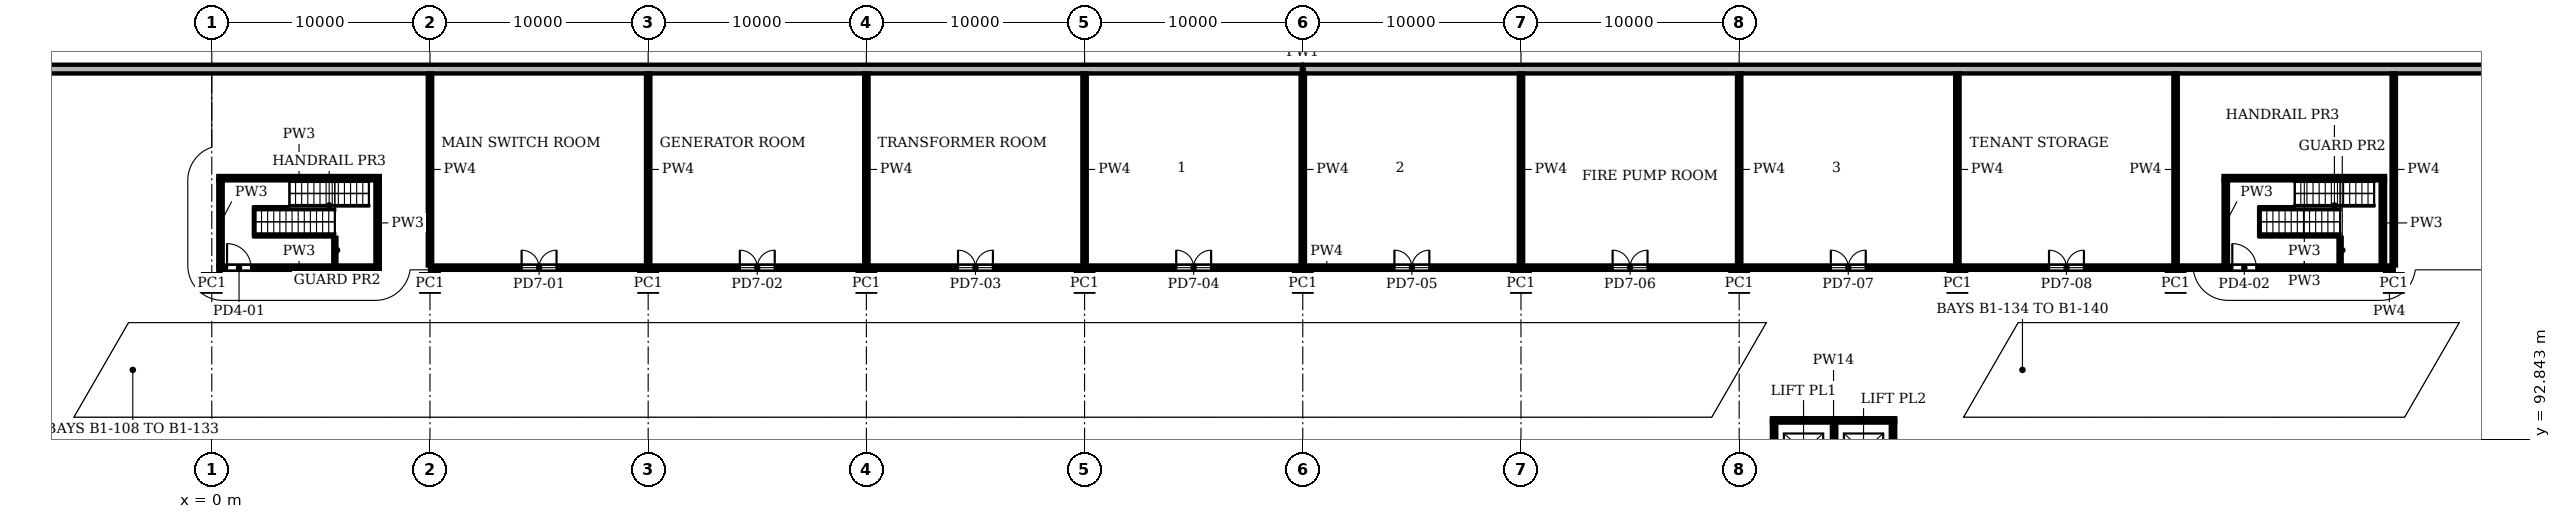
"""IFC4 building model, lengths in metres.
Left out: names, types, materials, properties, quantities, classifications, styles, units other than length and angle.
Written with IfcOpenShell. Run it as: python <this file> out.ifc"""

import sys

from ifc_helpers import new_model, si_unit, direction, frame, frame_2d, origin, origin_2d, place, context, subcontext, project, spatial, rectangle, extrude, element, fill, save


model = new_model("IFC4")
c1 = context("Model", 3, precision=1e-05, world=origin(), true_north=direction((0.0, 1.0)))
c2 = subcontext(c1, "Body", "Model", "MODEL_VIEW")
j1 = project(units=[si_unit("LENGTHUNIT", "METRE"), si_unit("PLANEANGLEUNIT", "RADIAN")], contexts=[c1])
p1 = place(None, origin())
s1 = spatial("IfcSite", under=j1, at=p1, CompositionType="ELEMENT")
p2 = place(p1, origin())
s2 = spatial("IfcBuilding", under=s1, at=p2, CompositionType="ELEMENT")
p3 = place(p2, frame((0.0, 0.0, -4.5)))
s3 = spatial("IfcBuildingStorey", under=s2, at=p3, CompositionType="ELEMENT", Elevation=-4.5)
for number, where, z_axis, x_axis in (
    (1, (0.0, 100.0, 0.0), (0.0, 0.0, 1.0), (1.0, 0.0, 0.0)),
    (2, (10.0, 100.0, 0.0), (0.0, 0.0, 1.0), (1.0, 0.0, 0.0)),
    (3, (20.0, 100.0, 0.0), (0.0, 0.0, 1.0), (1.0, 0.0, 0.0)),
    (4, (30.0, 100.0, 0.0), (0.0, 0.0, 1.0), (1.0, 0.0, 0.0)),
    (5, (40.0, 100.0, 0.0), (0.0, 0.0, 1.0), (1.0, 0.0, 0.0)),
    (6, (50.0, 100.0, 0.0), (0.0, 0.0, 1.0), (1.0, 0.0, 0.0)),
    (7, (60.0, 100.0, 0.0), (0.0, 0.0, 1.0), (1.0, 0.0, 0.0)),
    (8, (70.0, 100.0, 0.0), (0.0, 0.0, 1.0), (1.0, 0.0, 0.0)),
    (9, (80.0, 100.0, 0.0), (0.0, 0.0, 1.0), (1.0, 0.0, 0.0)),
    (10, (90.0, 100.0, 0.0), (0.0, 0.0, 1.0), (1.0, 0.0, 0.0)),
    (11, (100.0, 100.0, 0.0), (0.0, 0.0, 1.0), (1.0, 0.0, 0.0)),
):
    element("IfcColumn", number, at=place(p3, frame(where, z_axis=z_axis, x_axis=x_axis)), inside=s3, PredefinedType="COLUMN", context=c2, shape_type="SweptSolid", body=[
        extrude(rectangle(XDim=0.8, YDim=0.8, at=origin_2d()), origin(), (0.0, 0.0, 1.0), 4.0),
    ])
p4 = place(p3, frame((110.0, 109.8, 0.0), z_axis=(0.0, 0.0, 1.0), x_axis=(-1.0, 0.0, 0.0)))
e12 = element("IfcWall", 12, at=p4, inside=s3, PredefinedType="SOLIDWALL", context=c2, shape_type="SweptSolid", body=[
    extrude(rectangle(XDim=120.0, YDim=0.4, at=frame_2d((60.0, 0.0))), origin(), (0.0, 0.0, 1.0), 4.1),
])
p5 = place(p3, frame((10.0, 100.7, 0.0), z_axis=(0.0, 0.0, 1.0), x_axis=(1.0, 0.0, 0.0)))
e13 = element("IfcWall", 13, at=p5, inside=s3, PredefinedType="PARTITIONING", context=c2, shape_type="SweptSolid", body=[
    extrude(rectangle(XDim=82.2, YDim=0.2, at=frame_2d((41.1, 0.0))), origin(), (0.0, 0.0, 1.0), 4.0),
])
p6 = place(p5, frame((4.2, 0.0, 0.0)))
e14 = element("IfcOpeningElement", 14, at=p6, cuts=e13, PredefinedType="OPENING", context=c2, shape_type="SweptSolid", body=[
    extrude(rectangle(XDim=1.6, YDim=2.1, at=frame_2d((0.8, 1.05))), frame((0.0, 0.11, 0.0), z_axis=(0.0, -1.0, 0.0), x_axis=(1.0, 0.0, 0.0)), (0.0, 0.0, 1.0), 0.22),
])
p7 = place(p5, frame((14.2, 0.0, 0.0)))
e15 = element("IfcOpeningElement", 15, at=p7, cuts=e13, PredefinedType="OPENING", context=c2, shape_type="SweptSolid", body=[
    extrude(rectangle(XDim=1.6, YDim=2.1, at=frame_2d((0.8, 1.05))), frame((0.0, 0.11, 0.0), z_axis=(0.0, -1.0, 0.0), x_axis=(1.0, 0.0, 0.0)), (0.0, 0.0, 1.0), 0.22),
])
p8 = place(p5, frame((24.2, 0.0, 0.0)))
e16 = element("IfcOpeningElement", 16, at=p8, cuts=e13, PredefinedType="OPENING", context=c2, shape_type="SweptSolid", body=[
    extrude(rectangle(XDim=1.6, YDim=2.1, at=frame_2d((0.8, 1.05))), frame((0.0, 0.11, 0.0), z_axis=(0.0, -1.0, 0.0), x_axis=(1.0, 0.0, 0.0)), (0.0, 0.0, 1.0), 0.22),
])
p9 = place(p5, frame((34.2, 0.0, 0.0)))
e17 = element("IfcOpeningElement", 17, at=p9, cuts=e13, PredefinedType="OPENING", context=c2, shape_type="SweptSolid", body=[
    extrude(rectangle(XDim=1.6, YDim=2.1, at=frame_2d((0.8, 1.05))), frame((0.0, 0.11, 0.0), z_axis=(0.0, -1.0, 0.0), x_axis=(1.0, 0.0, 0.0)), (0.0, 0.0, 1.0), 0.22),
])
p10 = place(p5, frame((44.2, 0.0, 0.0)))
e18 = element("IfcOpeningElement", 18, at=p10, cuts=e13, PredefinedType="OPENING", context=c2, shape_type="SweptSolid", body=[
    extrude(rectangle(XDim=1.6, YDim=2.1, at=frame_2d((0.8, 1.05))), frame((0.0, 0.11, 0.0), z_axis=(0.0, -1.0, 0.0), x_axis=(1.0, 0.0, 0.0)), (0.0, 0.0, 1.0), 0.22),
])
p11 = place(p5, frame((54.2, 0.0, 0.0)))
e19 = element("IfcOpeningElement", 19, at=p11, cuts=e13, PredefinedType="OPENING", context=c2, shape_type="SweptSolid", body=[
    extrude(rectangle(XDim=1.6, YDim=2.1, at=frame_2d((0.8, 1.05))), frame((0.0, 0.11, 0.0), z_axis=(0.0, -1.0, 0.0), x_axis=(1.0, 0.0, 0.0)), (0.0, 0.0, 1.0), 0.22),
])
p12 = place(p5, frame((64.2, 0.0, 0.0)))
e20 = element("IfcOpeningElement", 20, at=p12, cuts=e13, PredefinedType="OPENING", context=c2, shape_type="SweptSolid", body=[
    extrude(rectangle(XDim=1.6, YDim=2.1, at=frame_2d((0.8, 1.05))), frame((0.0, 0.11, 0.0), z_axis=(0.0, -1.0, 0.0), x_axis=(1.0, 0.0, 0.0)), (0.0, 0.0, 1.0), 0.22),
])
p13 = place(p5, frame((74.2, 0.0, 0.0)))
e21 = element("IfcOpeningElement", 21, at=p13, cuts=e13, PredefinedType="OPENING", context=c2, shape_type="SweptSolid", body=[
    extrude(rectangle(XDim=1.6, YDim=2.1, at=frame_2d((0.8, 1.05))), frame((0.0, 0.11, 0.0), z_axis=(0.0, -1.0, 0.0), x_axis=(1.0, 0.0, 0.0)), (0.0, 0.0, 1.0), 0.22),
])
p14 = place(p3, frame((99.6, 100.7, 0.0), z_axis=(0.0, 0.0, 1.0), x_axis=(1.0, 0.0, 0.0)))
e22 = element("IfcWall", 22, at=p14, inside=s3, PredefinedType="PARTITIONING", context=c2, shape_type="SweptSolid", body=[
    extrude(rectangle(XDim=0.4, YDim=0.2, at=frame_2d((0.2, 0.0))), origin(), (0.0, 0.0, 1.0), 4.0),
])
for number, where, z_axis, x_axis in (
    (23, (10.0, 100.8, 0.0), (0.0, 0.0, 1.0), (0.0, 1.0, 0.0)),
    (24, (20.0, 100.8, 0.0), (0.0, 0.0, 1.0), (0.0, 1.0, 0.0)),
    (25, (30.0, 100.8, 0.0), (0.0, 0.0, 1.0), (0.0, 1.0, 0.0)),
    (26, (40.0, 100.8, 0.0), (0.0, 0.0, 1.0), (0.0, 1.0, 0.0)),
    (27, (50.0, 100.8, 0.0), (0.0, 0.0, 1.0), (0.0, 1.0, 0.0)),
    (28, (60.0, 100.8, 0.0), (0.0, 0.0, 1.0), (0.0, 1.0, 0.0)),
    (29, (70.0, 100.8, 0.0), (0.0, 0.0, 1.0), (0.0, 1.0, 0.0)),
    (30, (80.0, 100.8, 0.0), (0.0, 0.0, 1.0), (0.0, 1.0, 0.0)),
    (31, (90.0, 100.8, 0.0), (0.0, 0.0, 1.0), (0.0, 1.0, 0.0)),
    (32, (100.0, 100.8, 0.0), (0.0, 0.0, 1.0), (0.0, 1.0, 0.0)),
):
    element("IfcWall", number, at=place(p3, frame(where, z_axis=z_axis, x_axis=x_axis)), inside=s3, PredefinedType="PARTITIONING", context=c2, shape_type="SweptSolid", body=[
        extrude(rectangle(XDim=8.8, YDim=0.2, at=frame_2d((4.4, 0.0))), origin(), (0.0, 0.0, 1.0), 4.0),
    ])
p15 = place(p3, frame((0.3, 100.7, 0.0), z_axis=(0.0, 0.0, 1.0), x_axis=(1.0, 0.0, 0.0)))
e33 = element("IfcWall", 33, at=p15, inside=s3, PredefinedType="SOLIDWALL", context=c2, shape_type="SweptSolid", body=[
    extrude(rectangle(XDim=7.4, YDim=0.2, at=frame_2d((3.7, 0.0))), origin(), (0.0, 0.0, 1.0), 4.0),
])
p16 = place(p15, frame((0.4, 0.0, 0.0)))
e34 = element("IfcOpeningElement", 34, at=p16, cuts=e33, PredefinedType="OPENING", context=c2, shape_type="SweptSolid", body=[
    extrude(rectangle(XDim=1.1, YDim=2.1, at=frame_2d((0.55, 1.05))), frame((0.0, 0.11, 0.0), z_axis=(0.0, -1.0, 0.0), x_axis=(1.0, 0.0, 0.0)), (0.0, 0.0, 1.0), 0.22),
])
p17 = place(p3, frame((0.3, 104.8, 0.0), z_axis=(0.0, 0.0, 1.0), x_axis=(1.0, 0.0, 0.0)))
e35 = element("IfcWall", 35, at=p17, inside=s3, PredefinedType="SOLIDWALL", context=c2, shape_type="SweptSolid", body=[
    extrude(rectangle(XDim=7.4, YDim=0.2, at=frame_2d((3.7, 0.0))), origin(), (0.0, 0.0, 1.0), 4.0),
])
for number, where, z_axis, x_axis in (
    (36, (0.4, 100.8, 0.0), (0.0, 0.0, 1.0), (0.0, 1.0, 0.0)),
    (37, (7.6, 100.8, 0.0), (0.0, 0.0, 1.0), (0.0, 1.0, 0.0)),
):
    element("IfcWall", number, at=place(p3, frame(where, z_axis=z_axis, x_axis=x_axis)), inside=s3, PredefinedType="SOLIDWALL", context=c2, shape_type="SweptSolid", body=[
        extrude(rectangle(XDim=3.9, YDim=0.2, at=frame_2d((1.95, 0.0))), origin(), (0.0, 0.0, 1.0), 4.0),
    ])
p18 = place(p3, frame((92.2, 100.7, 0.0), z_axis=(0.0, 0.0, 1.0), x_axis=(1.0, 0.0, 0.0)))
e38 = element("IfcWall", 38, at=p18, inside=s3, PredefinedType="SOLIDWALL", context=c2, shape_type="SweptSolid", body=[
    extrude(rectangle(XDim=7.4, YDim=0.2, at=frame_2d((3.7, 0.0))), origin(), (0.0, 0.0, 1.0), 4.0),
])
p19 = place(p18, frame((0.4, 0.0, 0.0)))
e39 = element("IfcOpeningElement", 39, at=p19, cuts=e38, PredefinedType="OPENING", context=c2, shape_type="SweptSolid", body=[
    extrude(rectangle(XDim=1.1, YDim=2.1, at=frame_2d((0.55, 1.05))), frame((0.0, 0.11, 0.0), z_axis=(0.0, -1.0, 0.0), x_axis=(1.0, 0.0, 0.0)), (0.0, 0.0, 1.0), 0.22),
])
p20 = place(p3, frame((92.2, 104.8, 0.0), z_axis=(0.0, 0.0, 1.0), x_axis=(1.0, 0.0, 0.0)))
e40 = element("IfcWall", 40, at=p20, inside=s3, PredefinedType="SOLIDWALL", context=c2, shape_type="SweptSolid", body=[
    extrude(rectangle(XDim=7.4, YDim=0.2, at=frame_2d((3.7, 0.0))), origin(), (0.0, 0.0, 1.0), 4.0),
])
for number, where, z_axis, x_axis in (
    (41, (92.3, 100.8, 0.0), (0.0, 0.0, 1.0), (0.0, 1.0, 0.0)),
    (42, (99.5, 100.8, 0.0), (0.0, 0.0, 1.0), (0.0, 1.0, 0.0)),
):
    element("IfcWall", number, at=place(p3, frame(where, z_axis=z_axis, x_axis=x_axis)), inside=s3, PredefinedType="SOLIDWALL", context=c2, shape_type="SweptSolid", body=[
        extrude(rectangle(XDim=3.9, YDim=0.2, at=frame_2d((1.95, 0.0))), origin(), (0.0, 0.0, 1.0), 4.0),
    ])
p21 = place(p3, frame((71.5, 93.7, 0.0), z_axis=(0.0, 0.0, 1.0), x_axis=(1.0, 0.0, 0.0)))
e43 = element("IfcWall", 43, at=p21, inside=s3, PredefinedType="SOLIDWALL", context=c2, shape_type="SweptSolid", body=[
    extrude(rectangle(XDim=5.65, YDim=0.2, at=frame_2d((2.825, 0.0))), origin(), (0.0, 0.0, 1.0), 4.0),
])
for number, where, z_axis, x_axis in (
    (44, (71.6, 90.9, 0.0), (0.0, 0.0, 1.0), (0.0, 1.0, 0.0)),
    (45, (74.35, 90.9, 0.0), (0.0, 0.0, 1.0), (0.0, 1.0, 0.0)),
    (46, (77.05, 90.9, 0.0), (0.0, 0.0, 1.0), (0.0, 1.0, 0.0)),
):
    element("IfcWall", number, at=place(p3, frame(where, z_axis=z_axis, x_axis=x_axis)), inside=s3, PredefinedType="SOLIDWALL", context=c2, shape_type="SweptSolid", body=[
        extrude(rectangle(XDim=2.8, YDim=0.2, at=frame_2d((1.4, 0.0))), origin(), (0.0, 0.0, 1.0), 4.0),
    ])
p22 = place(p6, origin())
e47 = element("IfcDoor", 47, at=p22, inside=s3, OperationType="DOUBLE_DOOR_SINGLE_SWING", PredefinedType="DOOR", context=c2, shape_type="SweptSolid", body=[
    extrude(rectangle(XDim=1.6, YDim=2.1, at=frame_2d((0.8, 1.05))), frame((0.0, 0.025, 0.0), z_axis=(0.0, -1.0, 0.0), x_axis=(1.0, 0.0, 0.0)), (0.0, 0.0, 1.0), 0.05),
])
fill(e14, e47)
p23 = place(p7, origin())
e48 = element("IfcDoor", 48, at=p23, inside=s3, OperationType="DOUBLE_DOOR_SINGLE_SWING", PredefinedType="DOOR", context=c2, shape_type="SweptSolid", body=[
    extrude(rectangle(XDim=1.6, YDim=2.1, at=frame_2d((0.8, 1.05))), frame((0.0, 0.025, 0.0), z_axis=(0.0, -1.0, 0.0), x_axis=(1.0, 0.0, 0.0)), (0.0, 0.0, 1.0), 0.05),
])
fill(e15, e48)
p24 = place(p8, origin())
e49 = element("IfcDoor", 49, at=p24, inside=s3, OperationType="DOUBLE_DOOR_SINGLE_SWING", PredefinedType="DOOR", context=c2, shape_type="SweptSolid", body=[
    extrude(rectangle(XDim=1.6, YDim=2.1, at=frame_2d((0.8, 1.05))), frame((0.0, 0.025, 0.0), z_axis=(0.0, -1.0, 0.0), x_axis=(1.0, 0.0, 0.0)), (0.0, 0.0, 1.0), 0.05),
])
fill(e16, e49)
p25 = place(p9, origin())
e50 = element("IfcDoor", 50, at=p25, inside=s3, OperationType="DOUBLE_DOOR_SINGLE_SWING", PredefinedType="DOOR", context=c2, shape_type="SweptSolid", body=[
    extrude(rectangle(XDim=1.6, YDim=2.1, at=frame_2d((0.8, 1.05))), frame((0.0, 0.025, 0.0), z_axis=(0.0, -1.0, 0.0), x_axis=(1.0, 0.0, 0.0)), (0.0, 0.0, 1.0), 0.05),
])
fill(e17, e50)
p26 = place(p10, origin())
e51 = element("IfcDoor", 51, at=p26, inside=s3, OperationType="DOUBLE_DOOR_SINGLE_SWING", PredefinedType="DOOR", context=c2, shape_type="SweptSolid", body=[
    extrude(rectangle(XDim=1.6, YDim=2.1, at=frame_2d((0.8, 1.05))), frame((0.0, 0.025, 0.0), z_axis=(0.0, -1.0, 0.0), x_axis=(1.0, 0.0, 0.0)), (0.0, 0.0, 1.0), 0.05),
])
fill(e18, e51)
p27 = place(p11, origin())
e52 = element("IfcDoor", 52, at=p27, inside=s3, OperationType="DOUBLE_DOOR_SINGLE_SWING", PredefinedType="DOOR", context=c2, shape_type="SweptSolid", body=[
    extrude(rectangle(XDim=1.6, YDim=2.1, at=frame_2d((0.8, 1.05))), frame((0.0, 0.025, 0.0), z_axis=(0.0, -1.0, 0.0), x_axis=(1.0, 0.0, 0.0)), (0.0, 0.0, 1.0), 0.05),
])
fill(e19, e52)
p28 = place(p12, origin())
e53 = element("IfcDoor", 53, at=p28, inside=s3, OperationType="DOUBLE_DOOR_SINGLE_SWING", PredefinedType="DOOR", context=c2, shape_type="SweptSolid", body=[
    extrude(rectangle(XDim=1.6, YDim=2.1, at=frame_2d((0.8, 1.05))), frame((0.0, 0.025, 0.0), z_axis=(0.0, -1.0, 0.0), x_axis=(1.0, 0.0, 0.0)), (0.0, 0.0, 1.0), 0.05),
])
fill(e20, e53)
p29 = place(p13, origin())
e54 = element("IfcDoor", 54, at=p29, inside=s3, OperationType="DOUBLE_DOOR_SINGLE_SWING", PredefinedType="DOOR", context=c2, shape_type="SweptSolid", body=[
    extrude(rectangle(XDim=1.6, YDim=2.1, at=frame_2d((0.8, 1.05))), frame((0.0, 0.025, 0.0), z_axis=(0.0, -1.0, 0.0), x_axis=(1.0, 0.0, 0.0)), (0.0, 0.0, 1.0), 0.05),
])
fill(e21, e54)
p30 = place(p16, origin())
e55 = element("IfcDoor", 55, at=p30, inside=s3, OperationType="SINGLE_SWING_LEFT", PredefinedType="DOOR", context=c2, shape_type="SweptSolid", body=[
    extrude(rectangle(XDim=1.1, YDim=2.1, at=frame_2d((0.55, 1.05))), frame((0.0, 0.025, 0.0), z_axis=(0.0, -1.0, 0.0), x_axis=(1.0, 0.0, 0.0)), (0.0, 0.0, 1.0), 0.05),
])
fill(e34, e55)
p31 = place(p19, origin())
e56 = element("IfcDoor", 56, at=p31, inside=s3, OperationType="SINGLE_SWING_LEFT", PredefinedType="DOOR", context=c2, shape_type="SweptSolid", body=[
    extrude(rectangle(XDim=1.1, YDim=2.1, at=frame_2d((0.55, 1.05))), frame((0.0, 0.025, 0.0), z_axis=(0.0, -1.0, 0.0), x_axis=(1.0, 0.0, 0.0)), (0.0, 0.0, 1.0), 0.05),
])
fill(e39, e56)
save(model, sys.argv[1])
